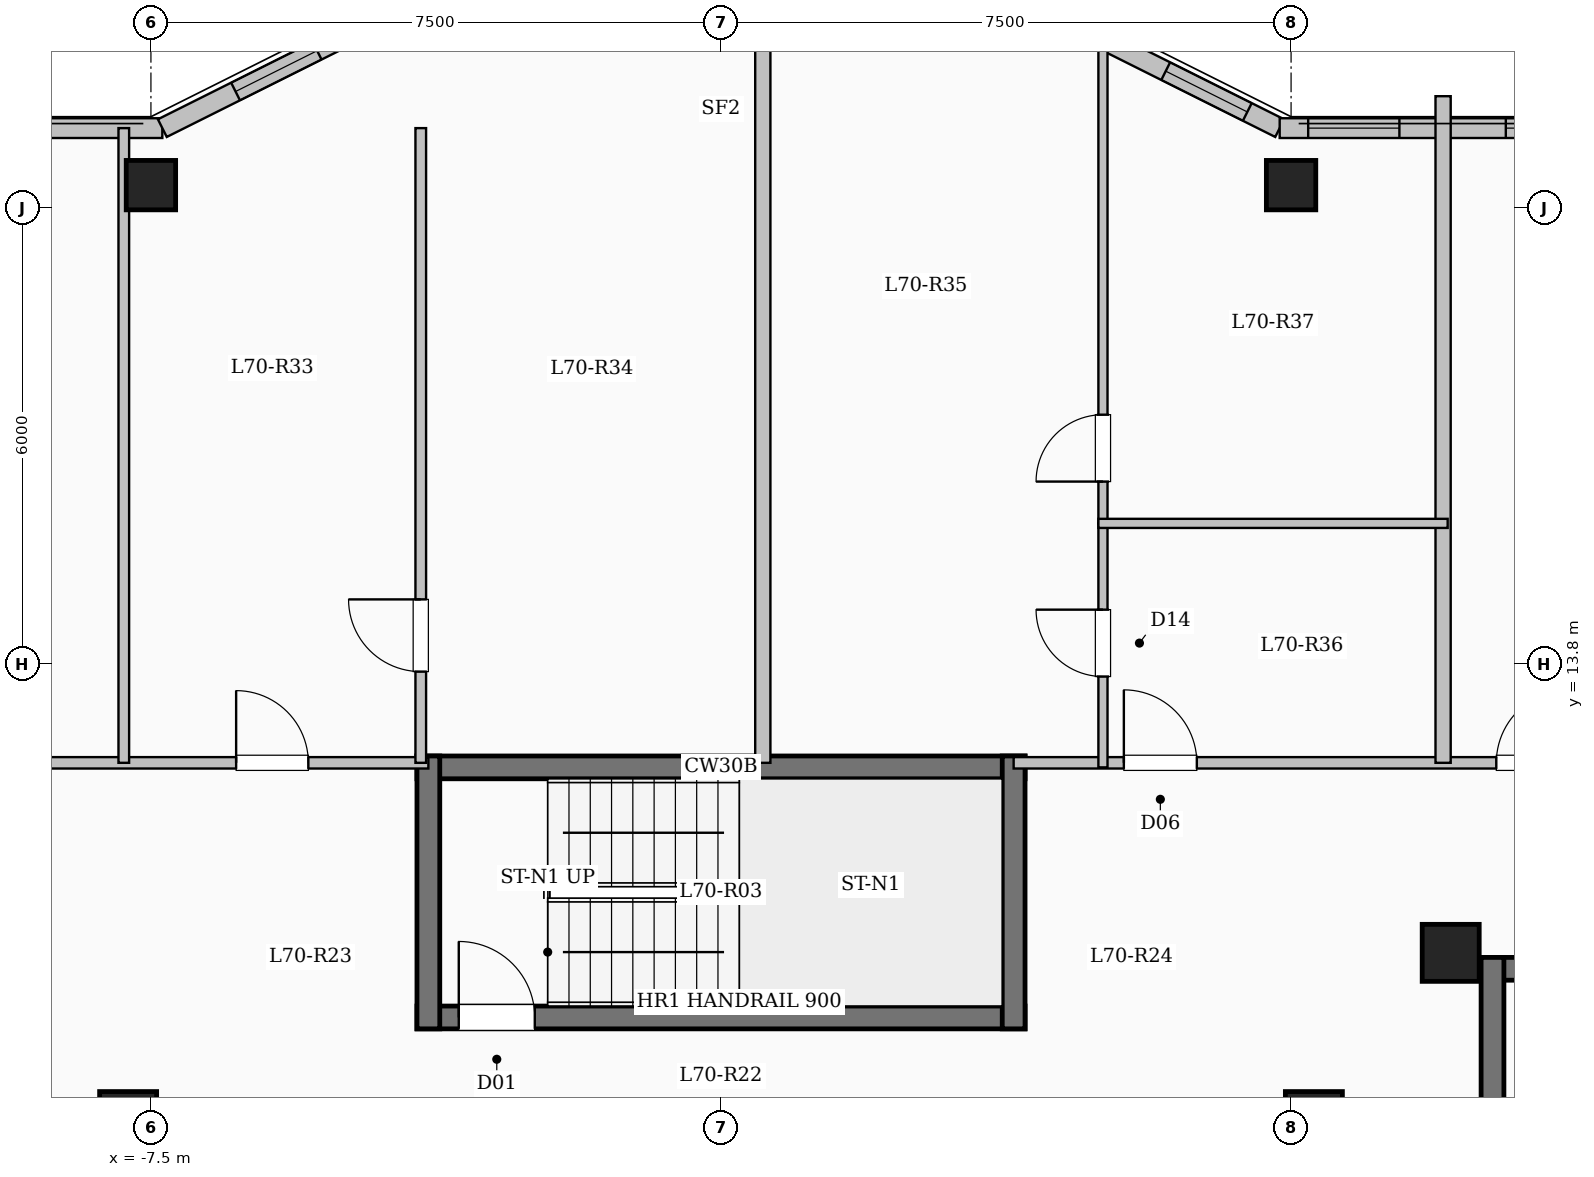
"""IFC4 building model, lengths in metres.
Left out: names, types, materials, properties, quantities, classifications, styles, units other than length and angle.
Written with IfcOpenShell. Run it as: python <this file> out.ifc"""

import sys

from ifc_helpers import new_model, si_unit, direction, frame, frame_2d, origin, origin_2d, place, context, subcontext, project, spatial, rectangle, extrude, element, fill, save


model = new_model("IFC4")
c1 = context("Model", 3, precision=1e-05, world=origin(), true_north=direction((0.0, 1.0)))
c2 = subcontext(c1, "Body", "Model", "MODEL_VIEW")
j1 = project(units=[si_unit("LENGTHUNIT", "METRE"), si_unit("PLANEANGLEUNIT", "RADIAN")], contexts=[c1])
p1 = place(None, origin())
s1 = spatial("IfcSite", under=j1, at=p1, CompositionType="ELEMENT")
p2 = place(p1, origin())
s2 = spatial("IfcBuilding", under=s1, at=p2, CompositionType="ELEMENT")
p3 = place(p2, frame((0.0, 0.0, 258.25)))
s3 = spatial("IfcBuildingStorey", under=s2, at=p3, CompositionType="ELEMENT", Elevation=258.25)
for number, where, z_axis, x_axis in (
    (1, (-7.8, 7.8, 0.0), (0.0, 0.0, 1.0), (1.0, 0.0, 0.0)),
    (2, (7.8, 7.8, 0.0), (0.0, 0.0, 1.0), (1.0, 0.0, 0.0)),
    (3, (9.6, 10.0, 0.0), (0.0, 0.0, 1.0), (1.0, 0.0, 0.0)),
):
    element("IfcColumn", number, at=place(p3, frame(where, z_axis=z_axis, x_axis=x_axis)), inside=s3, PredefinedType="COLUMN", context=c2, shape_type="SweptSolid", body=[
        extrude(rectangle(XDim=0.75, YDim=0.75, at=origin_2d()), origin(), (0.0, 0.0, 1.0), 3.35),
    ])
for number, where, z_axis, x_axis in (
    (4, (-7.5, 20.1, 0.0), (0.0, 0.0, 1.0), (1.0, 0.0, 0.0)),
    (5, (7.5, 20.1, 0.0), (0.0, 0.0, 1.0), (1.0, 0.0, 0.0)),
):
    element("IfcColumn", number, at=place(p3, frame(where, z_axis=z_axis, x_axis=x_axis)), inside=s3, PredefinedType="COLUMN", context=c2, shape_type="SweptSolid", body=[
        extrude(rectangle(XDim=0.65, YDim=0.65, at=origin_2d()), origin(), (0.0, 0.0, 1.0), 3.35),
    ])
p4 = place(p3, frame((-17.85, 20.85, 0.0), z_axis=(0.0, 0.0, 1.0), x_axis=(1.0, 0.0, 0.0)))
e6 = element("IfcWall", 6, at=p4, inside=s3, PredefinedType="SOLIDWALL", context=c2, shape_type="SweptSolid", body=[
    extrude(rectangle(XDim=10.5, YDim=0.26, at=frame_2d((5.25, 0.0))), origin(), (0.0, 0.0, 1.0), 3.1),
])
p5 = place(p4, frame((1.525, 0.0, 0.9)))
e7 = element("IfcOpeningElement", 7, at=p5, cuts=e6, PredefinedType="OPENING", context=c2, shape_type="SweptSolid", body=[
    extrude(rectangle(XDim=2.0, YDim=1.7, at=frame_2d((1.0, 0.85))), frame((0.0, 0.14, 0.0), z_axis=(0.0, -1.0, 0.0), x_axis=(1.0, 0.0, 0.0)), (0.0, 0.0, 1.0), 0.28),
])
p6 = place(p4, frame((6.675, 0.0, 0.9)))
e8 = element("IfcOpeningElement", 8, at=p6, cuts=e6, PredefinedType="OPENING", context=c2, shape_type="SweptSolid", body=[
    extrude(rectangle(XDim=1.65, YDim=1.6, at=frame_2d((0.825, 0.8))), frame((0.0, 0.14, 0.0), z_axis=(0.0, -1.0, 0.0), x_axis=(1.0, 0.0, 0.0)), (0.0, 0.0, 1.0), 0.28),
])
p7 = place(p3, frame((-7.35, 20.85, 0.0), z_axis=(0.0, 0.0, 1.0), x_axis=(0.894427191, 0.4472135955, 0.0)))
e9 = element("IfcWall", 9, at=p7, inside=s3, PredefinedType="SOLIDWALL", context=c2, shape_type="SweptSolid", body=[
    extrude(rectangle(XDim=3.354, YDim=0.26, at=frame_2d((1.677, 0.0))), origin(), (0.0, 0.0, 1.0), 3.1),
])
p8 = place(p7, frame((1.077, 0.0, 0.95)))
e10 = element("IfcOpeningElement", 10, at=p8, cuts=e9, PredefinedType="OPENING", context=c2, shape_type="SweptSolid", body=[
    extrude(rectangle(XDim=1.2, YDim=1.5, at=frame_2d((0.6, 0.75))), frame((0.0, 0.14, 0.0), z_axis=(0.0, -1.0, 0.0), x_axis=(1.0, 0.0, 0.0)), (0.0, 0.0, 1.0), 0.28),
])
p9 = place(p3, frame((4.35, 22.35, 0.0), z_axis=(0.0, 0.0, 1.0), x_axis=(0.894427191, -0.4472135955, 0.0)))
e11 = element("IfcWall", 11, at=p9, inside=s3, PredefinedType="SOLIDWALL", context=c2, shape_type="SweptSolid", body=[
    extrude(rectangle(XDim=3.354, YDim=0.26, at=frame_2d((1.677, 0.0))), origin(), (0.0, 0.0, 1.0), 3.1),
])
p10 = place(p9, frame((1.678, 0.0, 0.95)))
e12 = element("IfcOpeningElement", 12, at=p10, cuts=e11, PredefinedType="OPENING", context=c2, shape_type="SweptSolid", body=[
    extrude(rectangle(XDim=1.2, YDim=1.5, at=frame_2d((0.6, 0.75))), frame((0.0, 0.14, 0.0), z_axis=(0.0, -1.0, 0.0), x_axis=(1.0, 0.0, 0.0)), (0.0, 0.0, 1.0), 0.28),
])
p11 = place(p3, frame((7.35, 20.85, 0.0), z_axis=(0.0, 0.0, 1.0), x_axis=(1.0, 0.0, 0.0)))
e13 = element("IfcWall", 13, at=p11, inside=s3, PredefinedType="SOLIDWALL", context=c2, shape_type="SweptSolid", body=[
    extrude(rectangle(XDim=10.5, YDim=0.26, at=frame_2d((5.25, 0.0))), origin(), (0.0, 0.0, 1.0), 3.1),
])
p12 = place(p11, frame((0.375, 0.0, 0.95)))
e14 = element("IfcOpeningElement", 14, at=p12, cuts=e13, PredefinedType="OPENING", context=c2, shape_type="SweptSolid", body=[
    extrude(rectangle(XDim=1.2, YDim=1.5, at=frame_2d((0.6, 0.75))), frame((0.0, 0.14, 0.0), z_axis=(0.0, -1.0, 0.0), x_axis=(1.0, 0.0, 0.0)), (0.0, 0.0, 1.0), 0.28),
])
p13 = place(p11, frame((2.975, 0.0, 0.9)))
e15 = element("IfcOpeningElement", 15, at=p13, cuts=e13, PredefinedType="OPENING", context=c2, shape_type="SweptSolid", body=[
    extrude(rectangle(XDim=1.65, YDim=1.6, at=frame_2d((0.825, 0.8))), frame((0.0, 0.14, 0.0), z_axis=(0.0, -1.0, 0.0), x_axis=(1.0, 0.0, 0.0)), (0.0, 0.0, 1.0), 0.28),
])
p14 = place(p11, frame((6.1, 0.0, 0.95)))
e16 = element("IfcOpeningElement", 16, at=p14, cuts=e13, PredefinedType="OPENING", context=c2, shape_type="SweptSolid", body=[
    extrude(rectangle(XDim=1.2, YDim=1.5, at=frame_2d((0.6, 0.75))), frame((0.0, 0.14, 0.0), z_axis=(0.0, -1.0, 0.0), x_axis=(1.0, 0.0, 0.0)), (0.0, 0.0, 1.0), 0.28),
])
p15 = place(p11, frame((8.575, 0.0, 0.95)))
e17 = element("IfcOpeningElement", 17, at=p15, cuts=e13, PredefinedType="OPENING", context=c2, shape_type="SweptSolid", body=[
    extrude(rectangle(XDim=1.2, YDim=1.5, at=frame_2d((0.6, 0.75))), frame((0.0, 0.14, 0.0), z_axis=(0.0, -1.0, 0.0), x_axis=(1.0, 0.0, 0.0)), (0.0, 0.0, 1.0), 0.28),
])
p16 = place(p3, frame((10.0, 9.79, 0.0), z_axis=(0.0, 0.0, 1.0), x_axis=(1.0, 0.0, 0.0)))
e18 = element("IfcWall", 18, at=p16, inside=s3, PredefinedType="SHEAR", context=c2, shape_type="SweptSolid", body=[
    extrude(rectangle(XDim=8.0, YDim=0.3, at=frame_2d((4.0, 0.0))), origin(), (0.0, 0.0, 1.0), 3.35),
])
p17 = place(p3, frame((10.15, 6.35, 0.0), z_axis=(0.0, 0.0, 1.0), x_axis=(0.0, 1.0, 0.0)))
e19 = element("IfcWall", 19, at=p17, inside=s3, PredefinedType="SHEAR", context=c2, shape_type="SweptSolid", body=[
    extrude(rectangle(XDim=3.59, YDim=0.3, at=frame_2d((1.795, 0.0))), origin(), (0.0, 0.0, 1.0), 3.35),
])
p18 = place(p3, frame((-4.0, 12.44, 0.0), z_axis=(0.0, 0.0, 1.0), x_axis=(1.0, 0.0, 0.0)))
e20 = element("IfcWall", 20, at=p18, inside=s3, PredefinedType="SHEAR", context=c2, shape_type="SweptSolid", body=[
    extrude(rectangle(XDim=8.0, YDim=0.3, at=frame_2d((4.0, 0.0))), origin(), (0.0, 0.0, 1.0), 3.35),
])
p19 = place(p3, frame((-4.0, 9.15, 0.0), z_axis=(0.0, 0.0, 1.0), x_axis=(1.0, 0.0, 0.0)))
e21 = element("IfcWall", 21, at=p19, inside=s3, PredefinedType="SHEAR", context=c2, shape_type="SweptSolid", body=[
    extrude(rectangle(XDim=8.0, YDim=0.3, at=frame_2d((4.0, 0.0))), origin(), (0.0, 0.0, 1.0), 3.35),
])
p20 = place(p19, frame((0.55, 0.0, 0.0)))
e22 = element("IfcOpeningElement", 22, at=p20, cuts=e21, PredefinedType="OPENING", context=c2, shape_type="SweptSolid", body=[
    extrude(rectangle(XDim=1.0, YDim=2.15, at=frame_2d((0.5, 1.075))), frame((0.0, 0.16, 0.0), z_axis=(0.0, -1.0, 0.0), x_axis=(1.0, 0.0, 0.0)), (0.0, 0.0, 1.0), 0.32),
])
for number, where, z_axis, x_axis in (
    (23, (-3.85, 9.0, 0.0), (0.0, 0.0, 1.0), (0.0, 1.0, 0.0)),
    (24, (3.85, 9.0, 0.0), (0.0, 0.0, 1.0), (0.0, 1.0, 0.0)),
):
    element("IfcWall", number, at=place(p3, frame(where, z_axis=z_axis, x_axis=x_axis)), inside=s3, PredefinedType="SHEAR", context=c2, shape_type="SweptSolid", body=[
        extrude(rectangle(XDim=3.59, YDim=0.3, at=frame_2d((1.795, 0.0))), origin(), (0.0, 0.0, 1.0), 3.35),
    ])
p21 = place(p3, frame((-17.75, 12.5, 0.0), z_axis=(0.0, 0.0, 1.0), x_axis=(1.0, 0.0, 0.0)))
e25 = element("IfcWall", 25, at=p21, inside=s3, PredefinedType="PARTITIONING", context=c2, shape_type="SweptSolid", body=[
    extrude(rectangle(XDim=13.9, YDim=0.15, at=frame_2d((6.95, 0.0))), origin(), (0.0, 0.0, 1.0), 3.1),
])
p22 = place(p21, frame((1.968, 0.0, 0.0)))
e26 = element("IfcOpeningElement", 26, at=p22, cuts=e25, PredefinedType="OPENING", context=c2, shape_type="SweptSolid", body=[
    extrude(rectangle(XDim=0.95, YDim=2.15, at=frame_2d((0.475, 1.075))), frame((0.0, 0.085, 0.0), z_axis=(0.0, -1.0, 0.0), x_axis=(1.0, 0.0, 0.0)), (0.0, 0.0, 1.0), 0.17),
])
p23 = place(p21, frame((6.944, 0.0, 0.0)))
e27 = element("IfcOpeningElement", 27, at=p23, cuts=e25, PredefinedType="OPENING", context=c2, shape_type="SweptSolid", body=[
    extrude(rectangle(XDim=0.95, YDim=2.15, at=frame_2d((0.475, 1.075))), frame((0.0, 0.085, 0.0), z_axis=(0.0, -1.0, 0.0), x_axis=(1.0, 0.0, 0.0)), (0.0, 0.0, 1.0), 0.17),
])
p24 = place(p21, frame((11.371, 0.0, 0.0)))
e28 = element("IfcOpeningElement", 28, at=p24, cuts=e25, PredefinedType="OPENING", context=c2, shape_type="SweptSolid", body=[
    extrude(rectangle(XDim=0.95, YDim=2.15, at=frame_2d((0.475, 1.075))), frame((0.0, 0.085, 0.0), z_axis=(0.0, -1.0, 0.0), x_axis=(1.0, 0.0, 0.0)), (0.0, 0.0, 1.0), 0.17),
])
p25 = place(p3, frame((3.85, 12.5, 0.0), z_axis=(0.0, 0.0, 1.0), x_axis=(1.0, 0.0, 0.0)))
e29 = element("IfcWall", 29, at=p25, inside=s3, PredefinedType="PARTITIONING", context=c2, shape_type="SweptSolid", body=[
    extrude(rectangle(XDim=13.9, YDim=0.15, at=frame_2d((6.95, 0.0))), origin(), (0.0, 0.0, 1.0), 3.1),
])
p26 = place(p25, frame((1.45, 0.0, 0.0)))
e30 = element("IfcOpeningElement", 30, at=p26, cuts=e29, PredefinedType="OPENING", context=c2, shape_type="SweptSolid", body=[
    extrude(rectangle(XDim=0.96, YDim=2.15, at=frame_2d((0.48, 1.075))), frame((0.0, 0.085, 0.0), z_axis=(0.0, -1.0, 0.0), x_axis=(1.0, 0.0, 0.0)), (0.0, 0.0, 1.0), 0.17),
])
p27 = place(p25, frame((6.35, 0.0, 0.0)))
e31 = element("IfcOpeningElement", 31, at=p27, cuts=e29, PredefinedType="OPENING", context=c2, shape_type="SweptSolid", body=[
    extrude(rectangle(XDim=0.96, YDim=2.15, at=frame_2d((0.48, 1.075))), frame((0.0, 0.085, 0.0), z_axis=(0.0, -1.0, 0.0), x_axis=(1.0, 0.0, 0.0)), (0.0, 0.0, 1.0), 0.17),
])
p28 = place(p3, frame((0.55, 12.5, 0.0), z_axis=(0.0, 0.0, 1.0), x_axis=(0.0, 1.0, 0.0)))
e32 = element("IfcWall", 32, at=p28, inside=s3, PredefinedType="SOLIDWALL", context=c2, shape_type="SweptSolid", body=[
    extrude(rectangle(XDim=9.88, YDim=0.2, at=frame_2d((4.94, 0.0))), origin(), (0.0, 0.0, 1.0), 3.1),
])
p29 = place(p3, frame((-3.95, 12.5, 0.0), z_axis=(0.0, 0.0, 1.0), x_axis=(0.0, 1.0, 0.0)))
e33 = element("IfcWall", 33, at=p29, inside=s3, PredefinedType="PARTITIONING", context=c2, shape_type="SweptSolid", body=[
    extrude(rectangle(XDim=8.35, YDim=0.14, at=frame_2d((4.175, 0.0))), origin(), (0.0, 0.0, 1.0), 3.1),
])
p30 = place(p29, frame((1.2, 0.0, 0.0)))
e34 = element("IfcOpeningElement", 34, at=p30, cuts=e33, PredefinedType="OPENING", context=c2, shape_type="SweptSolid", body=[
    extrude(rectangle(XDim=0.95, YDim=2.15, at=frame_2d((0.475, 1.075))), frame((0.0, 0.08, 0.0), z_axis=(0.0, -1.0, 0.0), x_axis=(1.0, 0.0, 0.0)), (0.0, 0.0, 1.0), 0.16),
])
p31 = place(p3, frame((-7.857, 12.5, 0.0), z_axis=(0.0, 0.0, 1.0), x_axis=(0.0, 1.0, 0.0)))
e35 = element("IfcWall", 35, at=p31, inside=s3, PredefinedType="PARTITIONING", context=c2, shape_type="SweptSolid", body=[
    extrude(rectangle(XDim=8.35, YDim=0.14, at=frame_2d((4.175, 0.0))), origin(), (0.0, 0.0, 1.0), 2.685),
])
p32 = place(p3, frame((9.5, 12.5, 0.0), z_axis=(0.0, 0.0, 1.0), x_axis=(0.0, 1.0, 0.0)))
e36 = element("IfcWall", 36, at=p32, inside=s3, PredefinedType="SOLIDWALL", context=c2, shape_type="SweptSolid", body=[
    extrude(rectangle(XDim=8.77, YDim=0.2, at=frame_2d((4.385, 0.0))), origin(), (0.0, 0.0, 1.0), 3.1),
])
p33 = place(p3, frame((5.025, 12.44, 0.0), z_axis=(0.0, 0.0, 1.0), x_axis=(0.0, 1.0, 0.0)))
e37 = element("IfcWall", 37, at=p33, inside=s3, PredefinedType="PARTITIONING", context=c2, shape_type="SweptSolid", body=[
    extrude(rectangle(XDim=3.21, YDim=0.12, at=frame_2d((1.605, 0.0))), origin(), (0.0, 0.0, 1.0), 3.1),
])
p34 = place(p33, frame((1.195, 0.0, 0.0)))
e38 = element("IfcOpeningElement", 38, at=p34, cuts=e37, PredefinedType="OPENING", context=c2, shape_type="SweptSolid", body=[
    extrude(rectangle(XDim=0.88, YDim=2.1, at=frame_2d((0.44, 1.05))), frame((0.0, 0.07, 0.0), z_axis=(0.0, -1.0, 0.0), x_axis=(1.0, 0.0, 0.0)), (0.0, 0.0, 1.0), 0.14),
])
p35 = place(p3, frame((5.025, 15.65, 0.0), z_axis=(0.0, 0.0, 1.0), x_axis=(0.0, 1.0, 0.0)))
e39 = element("IfcWall", 39, at=p35, inside=s3, PredefinedType="PARTITIONING", context=c2, shape_type="SweptSolid", body=[
    extrude(rectangle(XDim=6.724, YDim=0.12, at=frame_2d((3.362, 0.0))), origin(), (0.0, 0.0, 1.0), 3.1),
])
p36 = place(p35, frame((0.55, 0.0, 0.0)))
e40 = element("IfcOpeningElement", 40, at=p36, cuts=e39, PredefinedType="OPENING", context=c2, shape_type="SweptSolid", body=[
    extrude(rectangle(XDim=0.88, YDim=2.1, at=frame_2d((0.44, 1.05))), frame((0.0, 0.07, 0.0), z_axis=(0.0, -1.0, 0.0), x_axis=(1.0, 0.0, 0.0)), (0.0, 0.0, 1.0), 0.14),
])
p37 = place(p3, frame((4.965, 15.65, 0.0), z_axis=(0.0, 0.0, 1.0), x_axis=(1.0, 0.0, 0.0)))
e41 = element("IfcWall", 41, at=p37, inside=s3, PredefinedType="PARTITIONING", context=c2, shape_type="SweptSolid", body=[
    extrude(rectangle(XDim=4.595, YDim=0.12, at=frame_2d((2.297, 0.0))), origin(), (0.0, 0.0, 1.0), 2.785),
])
p38 = place(p8, origin())
e42 = element("IfcWindow", 42, at=p38, inside=s3, PartitioningType="SINGLE_PANEL", PredefinedType="WINDOW", context=c2, shape_type="SweptSolid", body=[
    extrude(rectangle(XDim=1.2, YDim=1.5, at=frame_2d((0.6, 0.75))), frame((0.0, 0.03, 0.0), z_axis=(0.0, -1.0, 0.0), x_axis=(1.0, 0.0, 0.0)), (0.0, 0.0, 1.0), 0.06),
])
fill(e10, e42)
p39 = place(p10, origin())
e43 = element("IfcWindow", 43, at=p39, inside=s3, PartitioningType="SINGLE_PANEL", PredefinedType="WINDOW", context=c2, shape_type="SweptSolid", body=[
    extrude(rectangle(XDim=1.2, YDim=1.5, at=frame_2d((0.6, 0.75))), frame((0.0, 0.03, 0.0), z_axis=(0.0, -1.0, 0.0), x_axis=(1.0, 0.0, 0.0)), (0.0, 0.0, 1.0), 0.06),
])
fill(e12, e43)
p40 = place(p12, origin())
e44 = element("IfcWindow", 44, at=p40, inside=s3, PartitioningType="SINGLE_PANEL", PredefinedType="WINDOW", context=c2, shape_type="SweptSolid", body=[
    extrude(rectangle(XDim=1.2, YDim=1.5, at=frame_2d((0.6, 0.75))), frame((0.0, 0.03, 0.0), z_axis=(0.0, -1.0, 0.0), x_axis=(1.0, 0.0, 0.0)), (0.0, 0.0, 1.0), 0.06),
])
fill(e14, e44)
p41 = place(p13, origin())
e45 = element("IfcWindow", 45, at=p41, inside=s3, PartitioningType="SINGLE_PANEL", PredefinedType="WINDOW", context=c2, shape_type="SweptSolid", body=[
    extrude(rectangle(XDim=1.65, YDim=1.6, at=frame_2d((0.825, 0.8))), frame((0.0, 0.03, 0.0), z_axis=(0.0, -1.0, 0.0), x_axis=(1.0, 0.0, 0.0)), (0.0, 0.0, 1.0), 0.06),
])
fill(e15, e45)
p42 = place(p20, origin())
e46 = element("IfcDoor", 46, at=p42, inside=s3, OperationType="SINGLE_SWING_LEFT", PredefinedType="DOOR", context=c2, shape_type="SweptSolid", body=[
    extrude(rectangle(XDim=1.0, YDim=2.15, at=frame_2d((0.5, 1.075))), frame((0.0, 0.025, 0.0), z_axis=(0.0, -1.0, 0.0), x_axis=(1.0, 0.0, 0.0)), (0.0, 0.0, 1.0), 0.05),
])
fill(e22, e46)
p43 = place(p24, origin())
e47 = element("IfcDoor", 47, at=p43, inside=s3, OperationType="SINGLE_SWING_LEFT", PredefinedType="DOOR", context=c2, shape_type="SweptSolid", body=[
    extrude(rectangle(XDim=0.95, YDim=2.15, at=frame_2d((0.475, 1.075))), frame((0.0, 0.025, 0.0), z_axis=(0.0, -1.0, 0.0), x_axis=(1.0, 0.0, 0.0)), (0.0, 0.0, 1.0), 0.05),
])
fill(e28, e47)
p44 = place(p30, origin())
e48 = element("IfcDoor", 48, at=p44, inside=s3, OperationType="SINGLE_SWING_RIGHT", PredefinedType="DOOR", context=c2, shape_type="SweptSolid", body=[
    extrude(rectangle(XDim=0.95, YDim=2.15, at=frame_2d((0.475, 1.075))), frame((0.0, 0.025, 0.0), z_axis=(0.0, -1.0, 0.0), x_axis=(1.0, 0.0, 0.0)), (0.0, 0.0, 1.0), 0.05),
])
fill(e34, e48)
p45 = place(p26, origin())
e49 = element("IfcDoor", 49, at=p45, inside=s3, OperationType="SINGLE_SWING_LEFT", PredefinedType="DOOR", context=c2, shape_type="SweptSolid", body=[
    extrude(rectangle(XDim=0.96, YDim=2.15, at=frame_2d((0.48, 1.075))), frame((0.0, 0.025, 0.0), z_axis=(0.0, -1.0, 0.0), x_axis=(1.0, 0.0, 0.0)), (0.0, 0.0, 1.0), 0.05),
])
fill(e30, e49)
p46 = place(p34, origin())
e50 = element("IfcDoor", 50, at=p46, inside=s3, OperationType="SINGLE_SWING_RIGHT", PredefinedType="DOOR", context=c2, shape_type="SweptSolid", body=[
    extrude(rectangle(XDim=0.88, YDim=2.1, at=frame_2d((0.44, 1.05))), frame((0.0, 0.025, 0.0), z_axis=(0.0, -1.0, 0.0), x_axis=(1.0, 0.0, 0.0)), (0.0, 0.0, 1.0), 0.05),
])
fill(e38, e50)
p47 = place(p36, origin())
e51 = element("IfcDoor", 51, at=p47, inside=s3, OperationType="SINGLE_SWING_LEFT", PredefinedType="DOOR", context=c2, shape_type="SweptSolid", body=[
    extrude(rectangle(XDim=0.88, YDim=2.1, at=frame_2d((0.44, 1.05))), frame((0.0, 0.025, 0.0), z_axis=(0.0, -1.0, 0.0), x_axis=(1.0, 0.0, 0.0)), (0.0, 0.0, 1.0), 0.05),
])
fill(e40, e51)
p48 = place(p27, origin())
e52 = element("IfcDoor", 52, at=p48, inside=s3, OperationType="SINGLE_SWING_RIGHT", PredefinedType="DOOR", context=c2, shape_type="SweptSolid", body=[
    extrude(rectangle(XDim=0.96, YDim=2.15, at=frame_2d((0.48, 1.075))), frame((0.0, 0.025, 0.0), z_axis=(0.0, -1.0, 0.0), x_axis=(1.0, 0.0, 0.0)), (0.0, 0.0, 1.0), 0.05),
])
fill(e31, e52)
save(model, sys.argv[1])
